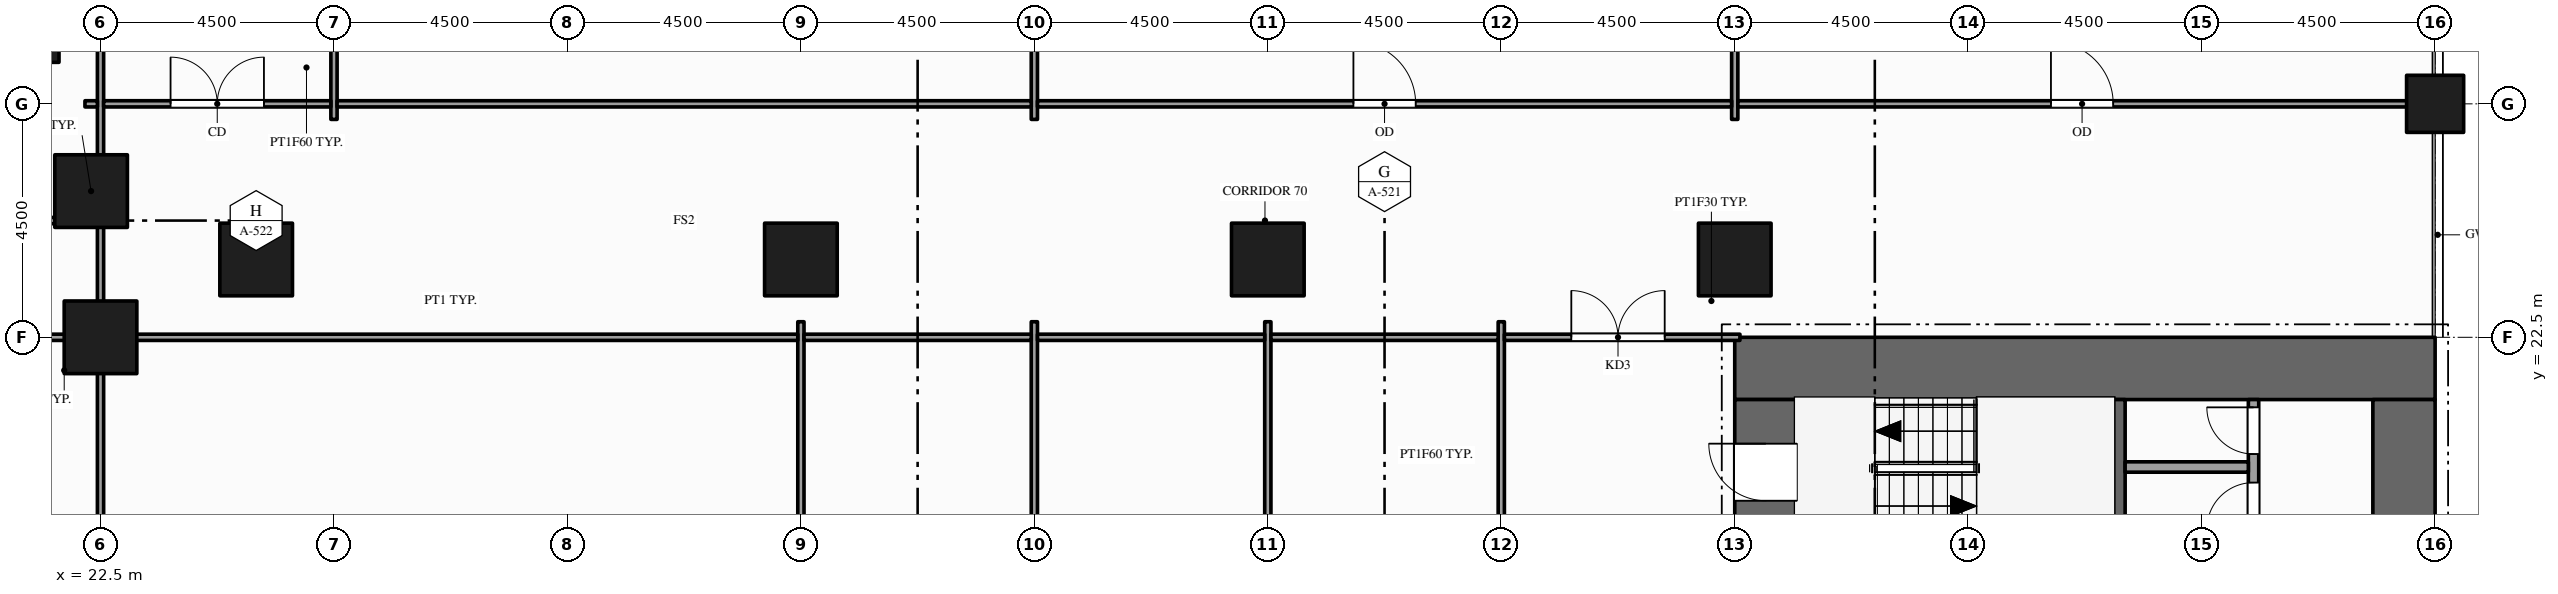
"""IFC4 building model, lengths in metres.
Left out: names, types, materials, properties, quantities, classifications, styles, units other than length and angle.
Written with IfcOpenShell. Run it as: python <this file> out.ifc"""

import sys

from ifc_helpers import new_model, si_unit, direction, frame, frame_2d, origin, origin_2d, place, context, subcontext, project, spatial, rectangle, hollow_rectangle, extrude, element, fill, save


model = new_model("IFC4")
c1 = context("Model", 3, precision=1e-05, world=origin(), true_north=direction((0.0, 1.0)))
c2 = subcontext(c1, "Body", "Model", "MODEL_VIEW")
j1 = project(units=[si_unit("LENGTHUNIT", "METRE"), si_unit("PLANEANGLEUNIT", "RADIAN")], contexts=[c1])
p1 = place(None, origin())
s1 = spatial("IfcSite", under=j1, at=p1, CompositionType="ELEMENT")
p2 = place(p1, origin())
s2 = spatial("IfcBuilding", under=s1, at=p2, CompositionType="ELEMENT")
p3 = place(p2, frame((0.0, 0.0, 19.0)))
s3 = spatial("IfcBuildingStorey", under=s2, at=p3, CompositionType="ELEMENT", Elevation=19.0)
p4 = place(p3, frame((54.0, 21.9, -0.15), z_axis=(0.0, 0.0, 1.0), x_axis=(1.0, 0.0, 0.0)))
e1 = element("IfcWall", 1, at=p4, inside=s3, PredefinedType="SHEAR", context=c2, shape_type="SweptSolid", body=[
    extrude(rectangle(XDim=13.5, YDim=1.2, at=frame_2d((6.75, 0.0))), origin(), (0.0, 0.0, 1.0), 5.0),
])
p5 = place(p3, frame((54.6, 1.2, -0.15), z_axis=(0.0, 0.0, 1.0), x_axis=(0.0, 1.0, 0.0)))
e2 = element("IfcWall", 2, at=p5, inside=s3, PredefinedType="SHEAR", context=c2, shape_type="SweptSolid", body=[
    extrude(rectangle(XDim=20.1, YDim=1.2, at=frame_2d((10.05, 0.0))), origin(), (0.0, 0.0, 1.0), 5.0),
])
p6 = place(p5, frame((5.9, 0.0, 0.15)))
e3 = element("IfcOpeningElement", 3, at=p6, cuts=e2, PredefinedType="OPENING", context=c2, shape_type="SweptSolid", body=[
    extrude(rectangle(XDim=1.8, YDim=2.1, at=frame_2d((0.9, 1.05))), frame((0.0, 0.61, 0.0), z_axis=(0.0, -1.0, 0.0), x_axis=(1.0, 0.0, 0.0)), (0.0, 0.0, 1.0), 1.22),
])
p7 = place(p5, frame((11.95, 0.0, 0.15)))
e4 = element("IfcOpeningElement", 4, at=p7, cuts=e2, PredefinedType="OPENING", context=c2, shape_type="SweptSolid", body=[
    extrude(rectangle(XDim=1.1, YDim=2.1, at=frame_2d((0.55, 1.05))), frame((0.0, 0.61, 0.0), z_axis=(0.0, -1.0, 0.0), x_axis=(1.0, 0.0, 0.0)), (0.0, 0.0, 1.0), 1.22),
])
p8 = place(p5, frame((0.95, 0.0, 0.15)))
e5 = element("IfcOpeningElement", 5, at=p8, cuts=e2, PredefinedType="OPENING", context=c2, shape_type="SweptSolid", body=[
    extrude(rectangle(XDim=1.1, YDim=2.1, at=frame_2d((0.55, 1.05))), frame((0.0, 0.61, 0.0), z_axis=(0.0, -1.0, 0.0), x_axis=(1.0, 0.0, 0.0)), (0.0, 0.0, 1.0), 1.22),
])
p9 = place(p5, frame((18.15, 0.0, 0.15)))
e6 = element("IfcOpeningElement", 6, at=p9, cuts=e2, PredefinedType="OPENING", context=c2, shape_type="SweptSolid", body=[
    extrude(rectangle(XDim=1.1, YDim=2.1, at=frame_2d((0.55, 1.05))), frame((0.0, 0.61, 0.0), z_axis=(0.0, -1.0, 0.0), x_axis=(1.0, 0.0, 0.0)), (0.0, 0.0, 1.0), 1.22),
])
p10 = place(p3, frame((66.9, 1.2, -0.15), z_axis=(0.0, 0.0, 1.0), x_axis=(0.0, 1.0, 0.0)))
e7 = element("IfcWall", 7, at=p10, inside=s3, PredefinedType="SHEAR", context=c2, shape_type="SweptSolid", body=[
    extrude(rectangle(XDim=20.1, YDim=1.2, at=frame_2d((10.05, 0.0))), origin(), (0.0, 0.0, 1.0), 5.0),
])
for number, where, z_axis, x_axis in (
    (8, (21.0, 28.5, -0.25), (0.0, 0.0, 1.0), (1.0, 0.0, 0.0)),
    (9, (22.318, 25.318, -0.25), (0.0, 0.0, 1.0), (1.0, 0.0, 0.0)),
    (10, (22.5, 22.5, -0.25), (0.0, 0.0, 1.0), (1.0, 0.0, 0.0)),
    (11, (25.5, 24.0, -0.25), (0.0, 0.0, 1.0), (1.0, 0.0, 0.0)),
    (12, (36.0, 24.0, -0.25), (0.0, 0.0, 1.0), (1.0, 0.0, 0.0)),
    (13, (45.0, 24.0, -0.25), (0.0, 0.0, 1.0), (1.0, 0.0, 0.0)),
    (14, (54.0, 24.0, -0.25), (0.0, 0.0, 1.0), (1.0, 0.0, 0.0)),
):
    element("IfcColumn", number, at=place(p3, frame(where, z_axis=z_axis, x_axis=x_axis)), inside=s3, PredefinedType="COLUMN", context=c2, shape_type="SweptSolid", body=[
        extrude(hollow_rectangle(XDim=1.4, YDim=1.4, WallThickness=0.08, at=origin_2d()), origin(), (0.0, 0.0, 1.0), 5.0),
    ])
p11 = place(p3, frame((67.5, 27.0, -0.25), z_axis=(0.0, 0.0, 1.0), x_axis=(1.0, 0.0, 0.0)))
e15 = element("IfcColumn", 15, at=p11, inside=s3, PredefinedType="COLUMN", context=c2, shape_type="SweptSolid", body=[
    extrude(hollow_rectangle(XDim=1.1, YDim=1.1, WallThickness=0.06, at=origin_2d()), origin(), (0.0, 0.0, 1.0), 5.0),
])
p12 = place(p3, frame((22.5, 0.15, 0.0), z_axis=(0.0, 0.0, 1.0), x_axis=(0.0, 1.0, 0.0)))
e16 = element("IfcWall", 16, at=p12, inside=s3, PredefinedType="PARTITIONING", context=c2, shape_type="SweptSolid", body=[
    extrude(rectangle(XDim=35.95, YDim=0.12, at=frame_2d((17.975, 0.0))), origin(), (0.0, 0.0, 1.0), 3.759),
])
p13 = place(p12, frame((9.225, 0.0, 0.0)))
e17 = element("IfcOpeningElement", 17, at=p13, cuts=e16, PredefinedType="OPENING", context=c2, shape_type="SweptSolid", body=[
    extrude(rectangle(XDim=1.5, YDim=2.1, at=frame_2d((0.75, 1.05))), frame((0.0, 0.07, 0.0), z_axis=(0.0, -1.0, 0.0), x_axis=(1.0, 0.0, 0.0)), (0.0, 0.0, 1.0), 0.14),
])
p14 = place(p12, frame((32.7, 0.0, 0.0)))
e18 = element("IfcOpeningElement", 18, at=p14, cuts=e16, PredefinedType="OPENING", context=c2, shape_type="SweptSolid", body=[
    extrude(rectangle(XDim=1.8, YDim=2.1, at=frame_2d((0.9, 1.05))), frame((0.0, 0.07, 0.0), z_axis=(0.0, -1.0, 0.0), x_axis=(1.0, 0.0, 0.0)), (0.0, 0.0, 1.0), 0.14),
])
p15 = place(p3, frame((27.0, 26.7, 0.0), z_axis=(0.0, 0.0, 1.0), x_axis=(0.0, 1.0, 0.0)))
e19 = element("IfcWall", 19, at=p15, inside=s3, PredefinedType="PARTITIONING", context=c2, shape_type="SweptSolid", body=[
    extrude(rectangle(XDim=22.65, YDim=0.12, at=frame_2d((11.325, 0.0))), origin(), (0.0, 0.0, 1.0), 3.66),
])
p16 = place(p15, frame((10.895, 0.0, 0.0)))
e20 = element("IfcOpeningElement", 20, at=p16, cuts=e19, PredefinedType="OPENING", context=c2, shape_type="SweptSolid", body=[
    extrude(rectangle(XDim=1.2, YDim=2.1, at=frame_2d((0.6, 1.05))), frame((0.0, 0.07, 0.0), z_axis=(0.0, -1.0, 0.0), x_axis=(1.0, 0.0, 0.0)), (0.0, 0.0, 1.0), 0.14),
])
for number, where, z_axis, x_axis in (
    (21, (36.0, 10.95, 0.0), (0.0, 0.0, 1.0), (0.0, 1.0, 0.0)),
    (22, (40.5, 10.95, 0.0), (0.0, 0.0, 1.0), (0.0, 1.0, 0.0)),
):
    element("IfcWall", number, at=place(p3, frame(where, z_axis=z_axis, x_axis=x_axis)), inside=s3, PredefinedType="PARTITIONING", context=c2, shape_type="SweptSolid", body=[
        extrude(rectangle(XDim=11.85, YDim=0.12, at=frame_2d((5.925, 0.0))), origin(), (0.0, 0.0, 1.0), 3.759),
    ])
p17 = place(p3, frame((40.5, 26.7, 0.0), z_axis=(0.0, 0.0, 1.0), x_axis=(0.0, 1.0, 0.0)))
e23 = element("IfcWall", 23, at=p17, inside=s3, PredefinedType="PARTITIONING", context=c2, shape_type="SweptSolid", body=[
    extrude(rectangle(XDim=22.65, YDim=0.12, at=frame_2d((11.325, 0.0))), origin(), (0.0, 0.0, 1.0), 3.66),
])
p18 = place(p3, frame((45.0, 0.15, 0.0), z_axis=(0.0, 0.0, 1.0), x_axis=(0.0, 1.0, 0.0)))
e24 = element("IfcWall", 24, at=p18, inside=s3, PredefinedType="PARTITIONING", context=c2, shape_type="SweptSolid", body=[
    extrude(rectangle(XDim=22.65, YDim=0.12, at=frame_2d((11.325, 0.0))), origin(), (0.0, 0.0, 1.0), 3.759),
])
p19 = place(p18, frame((9.225, 0.0, 0.0)))
e25 = element("IfcOpeningElement", 25, at=p19, cuts=e24, PredefinedType="OPENING", context=c2, shape_type="SweptSolid", body=[
    extrude(rectangle(XDim=1.5, YDim=2.1, at=frame_2d((0.75, 1.05))), frame((0.0, 0.07, 0.0), z_axis=(0.0, -1.0, 0.0), x_axis=(1.0, 0.0, 0.0)), (0.0, 0.0, 1.0), 0.14),
])
p20 = place(p3, frame((49.5, 0.15, 0.0), z_axis=(0.0, 0.0, 1.0), x_axis=(0.0, 1.0, 0.0)))
e26 = element("IfcWall", 26, at=p20, inside=s3, PredefinedType="PARTITIONING", context=c2, shape_type="SweptSolid", body=[
    extrude(rectangle(XDim=22.65, YDim=0.12, at=frame_2d((11.325, 0.0))), origin(), (0.0, 0.0, 1.0), 3.759),
])
p21 = place(p20, frame((0.955, 0.0, 0.0)))
e27 = element("IfcOpeningElement", 27, at=p21, cuts=e26, PredefinedType="OPENING", context=c2, shape_type="SweptSolid", body=[
    extrude(rectangle(XDim=0.9, YDim=2.1, at=frame_2d((0.45, 1.05))), frame((0.0, 0.07, 0.0), z_axis=(0.0, -1.0, 0.0), x_axis=(1.0, 0.0, 0.0)), (0.0, 0.0, 1.0), 0.14),
])
p22 = place(p20, frame((3.9, 0.0, 0.0)))
e28 = element("IfcOpeningElement", 28, at=p22, cuts=e26, PredefinedType="OPENING", context=c2, shape_type="SweptSolid", body=[
    extrude(rectangle(XDim=0.9, YDim=2.1, at=frame_2d((0.45, 1.05))), frame((0.0, 0.07, 0.0), z_axis=(0.0, -1.0, 0.0), x_axis=(1.0, 0.0, 0.0)), (0.0, 0.0, 1.0), 0.14),
])
p23 = place(p20, frame((6.85, 0.0, 0.0)))
e29 = element("IfcOpeningElement", 29, at=p23, cuts=e26, PredefinedType="OPENING", context=c2, shape_type="SweptSolid", body=[
    extrude(rectangle(XDim=1.0, YDim=2.1, at=frame_2d((0.5, 1.05))), frame((0.0, 0.07, 0.0), z_axis=(0.0, -1.0, 0.0), x_axis=(1.0, 0.0, 0.0)), (0.0, 0.0, 1.0), 0.14),
])
p24 = place(p20, frame((16.275, 0.0, 0.0)))
e30 = element("IfcOpeningElement", 30, at=p24, cuts=e26, PredefinedType="OPENING", context=c2, shape_type="SweptSolid", body=[
    extrude(rectangle(XDim=0.9, YDim=2.1, at=frame_2d((0.45, 1.05))), frame((0.0, 0.07, 0.0), z_axis=(0.0, -1.0, 0.0), x_axis=(1.0, 0.0, 0.0)), (0.0, 0.0, 1.0), 0.14),
])
p25 = place(p20, frame((9.225, 0.0, 0.0)))
e31 = element("IfcOpeningElement", 31, at=p25, cuts=e26, PredefinedType="OPENING", context=c2, shape_type="SweptSolid", body=[
    extrude(rectangle(XDim=1.5, YDim=2.1, at=frame_2d((0.75, 1.05))), frame((0.0, 0.07, 0.0), z_axis=(0.0, -1.0, 0.0), x_axis=(1.0, 0.0, 0.0)), (0.0, 0.0, 1.0), 0.14),
])
p26 = place(p3, frame((54.0, 26.7, 0.0), z_axis=(0.0, 0.0, 1.0), x_axis=(0.0, 1.0, 0.0)))
e32 = element("IfcWall", 32, at=p26, inside=s3, PredefinedType="PARTITIONING", context=c2, shape_type="SweptSolid", body=[
    extrude(rectangle(XDim=22.65, YDim=0.12, at=frame_2d((11.325, 0.0))), origin(), (0.0, 0.0, 1.0), 3.66),
])
p27 = place(p3, frame((61.4, 18.375, 0.0), z_axis=(0.0, 0.0, 1.0), x_axis=(0.0, 1.0, 0.0)))
e33 = element("IfcWall", 33, at=p27, inside=s3, PredefinedType="SHEAR", context=c2, shape_type="SweptSolid", body=[
    extrude(rectangle(XDim=2.925, YDim=0.25, at=frame_2d((1.462, 0.0))), origin(), (0.0, 0.0, 1.0), 4.75),
])
p28 = place(p3, frame((64.0, 18.6, 0.0), z_axis=(0.0, 0.0, 1.0), x_axis=(0.0, 1.0, 0.0)))
e34 = element("IfcWall", 34, at=p28, inside=s3, PredefinedType="PARTITIONING", context=c2, shape_type="SweptSolid", body=[
    extrude(rectangle(XDim=2.7, YDim=0.2, at=frame_2d((1.35, 0.0))), origin(), (0.0, 0.0, 1.0), 4.75),
])
p29 = place(p28, frame((0.2, 0.0, 0.0)))
e35 = element("IfcOpeningElement", 35, at=p29, cuts=e34, PredefinedType="OPENING", context=c2, shape_type="SweptSolid", body=[
    extrude(rectangle(XDim=0.9, YDim=2.1, at=frame_2d((0.45, 1.05))), frame((0.0, 0.11, 0.0), z_axis=(0.0, -1.0, 0.0), x_axis=(1.0, 0.0, 0.0)), (0.0, 0.0, 1.0), 0.22),
])
p30 = place(p28, frame((1.65, 0.0, 0.0)))
e36 = element("IfcOpeningElement", 36, at=p30, cuts=e34, PredefinedType="OPENING", context=c2, shape_type="SweptSolid", body=[
    extrude(rectangle(XDim=0.9, YDim=2.1, at=frame_2d((0.45, 1.05))), frame((0.0, 0.11, 0.0), z_axis=(0.0, -1.0, 0.0), x_axis=(1.0, 0.0, 0.0)), (0.0, 0.0, 1.0), 0.22),
])
p31 = place(p3, frame((61.525, 20.0, 0.0), z_axis=(0.0, 0.0, 1.0), x_axis=(1.0, 0.0, 0.0)))
e37 = element("IfcWall", 37, at=p31, inside=s3, PredefinedType="PARTITIONING", context=c2, shape_type="SweptSolid", body=[
    extrude(rectangle(XDim=2.375, YDim=0.2, at=frame_2d((1.188, 0.0))), origin(), (0.0, 0.0, 1.0), 4.75),
])
p32 = place(p3, frame((11.31, 22.5, 0.0), z_axis=(0.0, 0.0, 1.0), x_axis=(1.0, 0.0, 0.0)))
e38 = element("IfcWall", 38, at=p32, inside=s3, PredefinedType="PARTITIONING", context=c2, shape_type="SweptSolid", body=[
    extrude(rectangle(XDim=11.13, YDim=0.12, at=frame_2d((5.565, 0.0))), origin(), (0.0, 0.0, 1.0), 3.5),
])
p33 = place(p3, frame((22.56, 22.5, 0.0), z_axis=(0.0, 0.0, 1.0), x_axis=(1.0, 0.0, 0.0)))
e39 = element("IfcWall", 39, at=p33, inside=s3, PredefinedType="PARTITIONING", context=c2, shape_type="SweptSolid", body=[
    extrude(rectangle(XDim=13.38, YDim=0.12, at=frame_2d((6.69, 0.0))), origin(), (0.0, 0.0, 1.0), 3.66),
])
for number, where, z_axis, x_axis in (
    (40, (36.06, 22.5, 0.0), (0.0, 0.0, 1.0), (1.0, 0.0, 0.0)),
    (41, (40.56, 22.5, 0.0), (0.0, 0.0, 1.0), (1.0, 0.0, 0.0)),
    (42, (45.06, 22.5, 0.0), (0.0, 0.0, 1.0), (1.0, 0.0, 0.0)),
):
    element("IfcWall", number, at=place(p3, frame(where, z_axis=z_axis, x_axis=x_axis)), inside=s3, PredefinedType="PARTITIONING", context=c2, shape_type="SweptSolid", body=[
        extrude(rectangle(XDim=4.38, YDim=0.12, at=frame_2d((2.19, 0.0))), origin(), (0.0, 0.0, 1.0), 3.66),
    ])
p34 = place(p3, frame((49.56, 22.5, 0.0), z_axis=(0.0, 0.0, 1.0), x_axis=(1.0, 0.0, 0.0)))
e43 = element("IfcWall", 43, at=p34, inside=s3, PredefinedType="PARTITIONING", context=c2, shape_type="SweptSolid", body=[
    extrude(rectangle(XDim=4.54, YDim=0.12, at=frame_2d((2.27, 0.0))), origin(), (0.0, 0.0, 1.0), 3.66),
])
p35 = place(p34, frame((1.29, 0.0, 0.0)))
e44 = element("IfcOpeningElement", 44, at=p35, cuts=e43, PredefinedType="OPENING", context=c2, shape_type="SweptSolid", body=[
    extrude(rectangle(XDim=1.8, YDim=2.1, at=frame_2d((0.9, 1.05))), frame((0.0, 0.07, 0.0), z_axis=(0.0, -1.0, 0.0), x_axis=(1.0, 0.0, 0.0)), (0.0, 0.0, 1.0), 0.14),
])
p36 = place(p3, frame((11.31, 24.75, 0.0), z_axis=(0.0, 0.0, 1.0), x_axis=(1.0, 0.0, 0.0)))
e45 = element("IfcWall", 45, at=p36, inside=s3, PredefinedType="PARTITIONING", context=c2, shape_type="SweptSolid", body=[
    extrude(rectangle(XDim=11.13, YDim=0.12, at=frame_2d((5.565, 0.0))), origin(), (0.0, 0.0, 1.0), 3.759),
])
p37 = place(p3, frame((22.56, 24.75, 0.0), z_axis=(0.0, 0.0, 1.0), x_axis=(1.0, 0.0, 0.0)))
e46 = element("IfcWall", 46, at=p37, inside=s3, PredefinedType="PARTITIONING", context=c2, shape_type="SweptSolid", body=[
    extrude(rectangle(XDim=0.24, YDim=0.12, at=frame_2d((0.12, 0.0))), origin(), (0.0, 0.0, 1.0), 4.75),
])
p38 = place(p3, frame((22.2, 27.0, 0.0), z_axis=(0.0, 0.0, 1.0), x_axis=(1.0, 0.0, 0.0)))
e47 = element("IfcWall", 47, at=p38, inside=s3, PredefinedType="PARTITIONING", context=c2, shape_type="SweptSolid", body=[
    extrude(rectangle(XDim=0.24, YDim=0.12, at=frame_2d((0.12, 0.0))), origin(), (0.0, 0.0, 1.0), 3.759),
])
p39 = place(p3, frame((22.56, 27.0, 0.0), z_axis=(0.0, 0.0, 1.0), x_axis=(1.0, 0.0, 0.0)))
e48 = element("IfcWall", 48, at=p39, inside=s3, PredefinedType="PARTITIONING", context=c2, shape_type="SweptSolid", body=[
    extrude(rectangle(XDim=4.38, YDim=0.12, at=frame_2d((2.19, 0.0))), origin(), (0.0, 0.0, 1.0), 3.66),
])
p40 = place(p39, frame((1.29, 0.0, 0.0)))
e49 = element("IfcOpeningElement", 49, at=p40, cuts=e48, PredefinedType="OPENING", context=c2, shape_type="SweptSolid", body=[
    extrude(rectangle(XDim=1.8, YDim=2.1, at=frame_2d((0.9, 1.05))), frame((0.0, 0.07, 0.0), z_axis=(0.0, -1.0, 0.0), x_axis=(1.0, 0.0, 0.0)), (0.0, 0.0, 1.0), 0.14),
])
p41 = place(p3, frame((27.06, 27.0, 0.0), z_axis=(0.0, 0.0, 1.0), x_axis=(1.0, 0.0, 0.0)))
e50 = element("IfcWall", 50, at=p41, inside=s3, PredefinedType="PARTITIONING", context=c2, shape_type="SweptSolid", body=[
    extrude(rectangle(XDim=13.38, YDim=0.12, at=frame_2d((6.69, 0.0))), origin(), (0.0, 0.0, 1.0), 3.66),
])
p42 = place(p3, frame((40.56, 27.0, 0.0), z_axis=(0.0, 0.0, 1.0), x_axis=(1.0, 0.0, 0.0)))
e51 = element("IfcWall", 51, at=p42, inside=s3, PredefinedType="PARTITIONING", context=c2, shape_type="SweptSolid", body=[
    extrude(rectangle(XDim=13.38, YDim=0.12, at=frame_2d((6.69, 0.0))), origin(), (0.0, 0.0, 1.0), 3.66),
])
p43 = place(p42, frame((6.09, 0.0, 0.0)))
e52 = element("IfcOpeningElement", 52, at=p43, cuts=e51, PredefinedType="OPENING", context=c2, shape_type="SweptSolid", body=[
    extrude(rectangle(XDim=1.2, YDim=2.1, at=frame_2d((0.6, 1.05))), frame((0.0, 0.07, 0.0), z_axis=(0.0, -1.0, 0.0), x_axis=(1.0, 0.0, 0.0)), (0.0, 0.0, 1.0), 0.14),
])
p44 = place(p3, frame((54.06, 27.0, 0.0), z_axis=(0.0, 0.0, 1.0), x_axis=(1.0, 0.0, 0.0)))
e53 = element("IfcWall", 53, at=p44, inside=s3, PredefinedType="PARTITIONING", context=c2, shape_type="SweptSolid", body=[
    extrude(rectangle(XDim=13.29, YDim=0.12, at=frame_2d((6.645, 0.0))), origin(), (0.0, 0.0, 1.0), 3.66),
])
p45 = place(p44, frame((6.035, 0.0, 0.0)))
e54 = element("IfcOpeningElement", 54, at=p45, cuts=e53, PredefinedType="OPENING", context=c2, shape_type="SweptSolid", body=[
    extrude(rectangle(XDim=1.2, YDim=2.1, at=frame_2d((0.6, 1.05))), frame((0.0, 0.07, 0.0), z_axis=(0.0, -1.0, 0.0), x_axis=(1.0, 0.0, 0.0)), (0.0, 0.0, 1.0), 0.14),
])
p46 = place(p9, origin())
e55 = element("IfcDoor", 55, at=p46, inside=s3, OperationType="SINGLE_SWING_RIGHT", PredefinedType="DOOR", context=c2, shape_type="SweptSolid", body=[
    extrude(rectangle(XDim=1.1, YDim=2.1, at=frame_2d((0.55, 1.05))), frame((0.0, 0.025, 0.0), z_axis=(0.0, -1.0, 0.0), x_axis=(1.0, 0.0, 0.0)), (0.0, 0.0, 1.0), 0.05),
])
fill(e6, e55)
p47 = place(p29, origin())
e56 = element("IfcDoor", 56, at=p47, inside=s3, OperationType="SINGLE_SWING_LEFT", PredefinedType="DOOR", context=c2, shape_type="SweptSolid", body=[
    extrude(rectangle(XDim=0.9, YDim=2.1, at=frame_2d((0.45, 1.05))), frame((0.0, 0.025, 0.0), z_axis=(0.0, -1.0, 0.0), x_axis=(1.0, 0.0, 0.0)), (0.0, 0.0, 1.0), 0.05),
])
fill(e35, e56)
p48 = place(p30, origin())
e57 = element("IfcDoor", 57, at=p48, inside=s3, OperationType="SINGLE_SWING_RIGHT", PredefinedType="DOOR", context=c2, shape_type="SweptSolid", body=[
    extrude(rectangle(XDim=0.9, YDim=2.1, at=frame_2d((0.45, 1.05))), frame((0.0, 0.025, 0.0), z_axis=(0.0, -1.0, 0.0), x_axis=(1.0, 0.0, 0.0)), (0.0, 0.0, 1.0), 0.05),
])
fill(e36, e57)
p49 = place(p35, origin())
e58 = element("IfcDoor", 58, at=p49, inside=s3, OperationType="DOUBLE_DOOR_SINGLE_SWING", PredefinedType="DOOR", context=c2, shape_type="SweptSolid", body=[
    extrude(rectangle(XDim=1.8, YDim=2.1, at=frame_2d((0.9, 1.05))), frame((0.0, 0.025, 0.0), z_axis=(0.0, -1.0, 0.0), x_axis=(1.0, 0.0, 0.0)), (0.0, 0.0, 1.0), 0.05),
])
fill(e44, e58)
p50 = place(p40, origin())
e59 = element("IfcDoor", 59, at=p50, inside=s3, OperationType="DOUBLE_DOOR_SINGLE_SWING", PredefinedType="DOOR", context=c2, shape_type="SweptSolid", body=[
    extrude(rectangle(XDim=1.8, YDim=2.1, at=frame_2d((0.9, 1.05))), frame((0.0, 0.025, 0.0), z_axis=(0.0, -1.0, 0.0), x_axis=(1.0, 0.0, 0.0)), (0.0, 0.0, 1.0), 0.05),
])
fill(e49, e59)
p51 = place(p43, origin())
e60 = element("IfcDoor", 60, at=p51, inside=s3, OperationType="SINGLE_SWING_LEFT", PredefinedType="DOOR", context=c2, shape_type="SweptSolid", body=[
    extrude(rectangle(XDim=1.2, YDim=2.1, at=frame_2d((0.6, 1.05))), frame((0.0, 0.025, 0.0), z_axis=(0.0, -1.0, 0.0), x_axis=(1.0, 0.0, 0.0)), (0.0, 0.0, 1.0), 0.05),
])
fill(e52, e60)
p52 = place(p45, origin())
e61 = element("IfcDoor", 61, at=p52, inside=s3, OperationType="SINGLE_SWING_LEFT", PredefinedType="DOOR", context=c2, shape_type="SweptSolid", body=[
    extrude(rectangle(XDim=1.2, YDim=2.1, at=frame_2d((0.6, 1.05))), frame((0.0, 0.025, 0.0), z_axis=(0.0, -1.0, 0.0), x_axis=(1.0, 0.0, 0.0)), (0.0, 0.0, 1.0), 0.05),
])
fill(e54, e61)
save(model, sys.argv[1])
